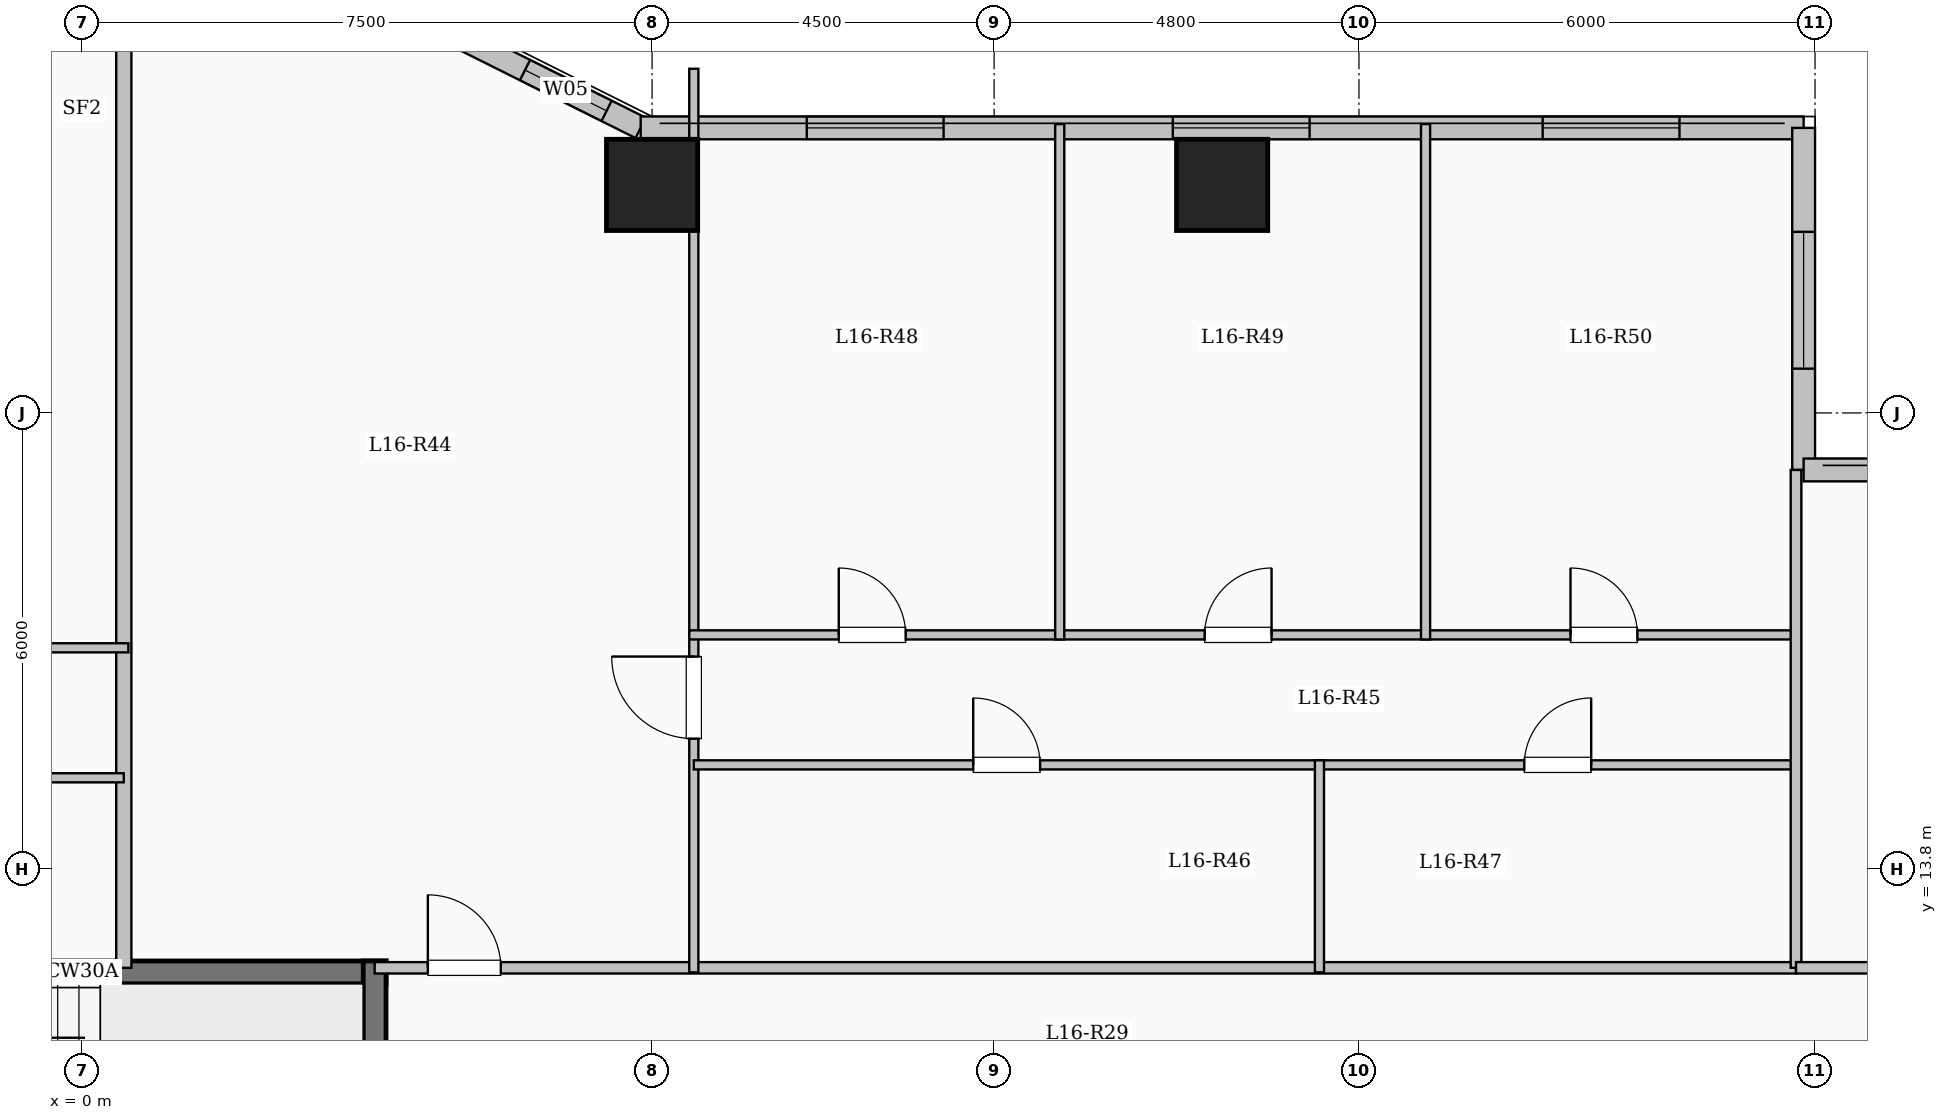
"""IFC4 building model, lengths in metres.
Left out: names, types, materials, properties, quantities, classifications, styles, units other than length and angle.
Written with IfcOpenShell. Run it as: python <this file> out.ifc"""

import sys

from ifc_helpers import new_model, si_unit, direction, frame, frame_2d, origin, origin_2d, place, context, subcontext, project, spatial, rectangle, extrude, element, fill, save


model = new_model("IFC4")
c1 = context("Model", 3, precision=1e-05, world=origin(), true_north=direction((0.0, 1.0)))
c2 = subcontext(c1, "Body", "Model", "MODEL_VIEW")
j1 = project(units=[si_unit("LENGTHUNIT", "METRE"), si_unit("PLANEANGLEUNIT", "RADIAN")], contexts=[c1])
p1 = place(None, origin())
s1 = spatial("IfcSite", under=j1, at=p1, CompositionType="ELEMENT")
p2 = place(p1, origin())
s2 = spatial("IfcBuilding", under=s1, at=p2, CompositionType="ELEMENT")
p3 = place(p2, frame((0.0, 0.0, 60.85)))
s3 = spatial("IfcBuildingStorey", under=s2, at=p3, CompositionType="ELEMENT", Elevation=60.85)
for number, where, z_axis, x_axis in (
    (1, (7.5, 22.8, 0.0), (0.0, 0.0, 1.0), (1.0, 0.0, 0.0)),
    (2, (15.0, 22.8, 0.0), (0.0, 0.0, 1.0), (1.0, 0.0, 0.0)),
):
    element("IfcColumn", number, at=place(p3, frame(where, z_axis=z_axis, x_axis=x_axis)), inside=s3, PredefinedType="COLUMN", context=c2, shape_type="SweptSolid", body=[
        extrude(rectangle(XDim=1.2, YDim=1.2, at=origin_2d()), origin(), (0.0, 0.0, 1.0), 3.35),
    ])
p4 = place(p3, frame((4.35, 25.05, 0.0), z_axis=(0.0, 0.0, 1.0), x_axis=(0.894427191, -0.4472135955, 0.0)))
e3 = element("IfcWall", 3, at=p4, inside=s3, PredefinedType="SOLIDWALL", context=c2, shape_type="SweptSolid", body=[
    extrude(rectangle(XDim=3.354, YDim=0.3, at=frame_2d((1.677, 0.0))), origin(), (0.0, 0.0, 1.0), 3.05),
])
p5 = place(p4, frame((1.653, 0.0, 0.95)))
e4 = element("IfcOpeningElement", 4, at=p5, cuts=e3, PredefinedType="OPENING", context=c2, shape_type="SweptSolid", body=[
    extrude(rectangle(XDim=1.2, YDim=1.5, at=frame_2d((0.6, 0.75))), frame((0.0, 0.16, 0.0), z_axis=(0.0, -1.0, 0.0), x_axis=(1.0, 0.0, 0.0)), (0.0, 0.0, 1.0), 0.32),
])
p6 = place(p3, frame((7.35, 23.55, 0.0), z_axis=(0.0, 0.0, 1.0), x_axis=(1.0, 0.0, 0.0)))
e5 = element("IfcWall", 5, at=p6, inside=s3, PredefinedType="SOLIDWALL", context=c2, shape_type="SweptSolid", body=[
    extrude(rectangle(XDim=15.3, YDim=0.3, at=frame_2d((7.65, 0.0))), origin(), (0.0, 0.0, 1.0), 3.05),
])
p7 = place(p6, frame((2.185, 0.0, 0.9)))
e6 = element("IfcOpeningElement", 6, at=p7, cuts=e5, PredefinedType="OPENING", context=c2, shape_type="SweptSolid", body=[
    extrude(rectangle(XDim=1.8, YDim=1.65, at=frame_2d((0.9, 0.825))), frame((0.0, 0.16, 0.0), z_axis=(0.0, -1.0, 0.0), x_axis=(1.0, 0.0, 0.0)), (0.0, 0.0, 1.0), 0.32),
])
p8 = place(p6, frame((7.001, 0.0, 0.9)))
e7 = element("IfcOpeningElement", 7, at=p8, cuts=e5, PredefinedType="OPENING", context=c2, shape_type="SweptSolid", body=[
    extrude(rectangle(XDim=1.8, YDim=1.65, at=frame_2d((0.9, 0.825))), frame((0.0, 0.16, 0.0), z_axis=(0.0, -1.0, 0.0), x_axis=(1.0, 0.0, 0.0)), (0.0, 0.0, 1.0), 0.32),
])
p9 = place(p6, frame((11.867, 0.0, 0.9)))
e8 = element("IfcOpeningElement", 8, at=p9, cuts=e5, PredefinedType="OPENING", context=c2, shape_type="SweptSolid", body=[
    extrude(rectangle(XDim=1.8, YDim=1.65, at=frame_2d((0.9, 0.825))), frame((0.0, 0.16, 0.0), z_axis=(0.0, -1.0, 0.0), x_axis=(1.0, 0.0, 0.0)), (0.0, 0.0, 1.0), 0.32),
])
p10 = place(p3, frame((22.65, 23.55, 0.0), z_axis=(0.0, 0.0, 1.0), x_axis=(0.0, -1.0, 0.0)))
e9 = element("IfcWall", 9, at=p10, inside=s3, PredefinedType="SOLIDWALL", context=c2, shape_type="SweptSolid", body=[
    extrude(rectangle(XDim=4.5, YDim=0.3, at=frame_2d((2.25, 0.0))), origin(), (0.0, 0.0, 1.0), 3.05),
])
p11 = place(p10, frame((1.367, 0.0, 0.9)))
e10 = element("IfcOpeningElement", 10, at=p11, cuts=e9, PredefinedType="OPENING", context=c2, shape_type="SweptSolid", body=[
    extrude(rectangle(XDim=1.8, YDim=1.65, at=frame_2d((0.9, 0.825))), frame((0.0, 0.16, 0.0), z_axis=(0.0, -1.0, 0.0), x_axis=(1.0, 0.0, 0.0)), (0.0, 0.0, 1.0), 0.32),
])
p12 = place(p3, frame((22.65, 19.05, 0.0), z_axis=(0.0, 0.0, 1.0), x_axis=(1.0, 0.0, 0.0)))
e11 = element("IfcWall", 11, at=p12, inside=s3, PredefinedType="SOLIDWALL", context=c2, shape_type="SweptSolid", body=[
    extrude(rectangle(XDim=6.0, YDim=0.3, at=frame_2d((3.0, 0.0))), origin(), (0.0, 0.0, 1.0), 3.05),
])
p13 = place(p12, frame((1.975, 0.0, 0.9)))
e12 = element("IfcOpeningElement", 12, at=p13, cuts=e11, PredefinedType="OPENING", context=c2, shape_type="SweptSolid", body=[
    extrude(rectangle(XDim=2.0, YDim=1.7, at=frame_2d((1.0, 0.85))), frame((0.0, 0.16, 0.0), z_axis=(0.0, -1.0, 0.0), x_axis=(1.0, 0.0, 0.0)), (0.0, 0.0, 1.0), 0.32),
])
p14 = place(p3, frame((-4.0, 12.44, 0.0), z_axis=(0.0, 0.0, 1.0), x_axis=(1.0, 0.0, 0.0)))
e13 = element("IfcWall", 13, at=p14, inside=s3, PredefinedType="SHEAR", context=c2, shape_type="SweptSolid", body=[
    extrude(rectangle(XDim=8.0, YDim=0.3, at=frame_2d((4.0, 0.0))), origin(), (0.0, 0.0, 1.0), 3.35),
])
p15 = place(p3, frame((3.85, 9.0, 0.0), z_axis=(0.0, 0.0, 1.0), x_axis=(0.0, 1.0, 0.0)))
e14 = element("IfcWall", 14, at=p15, inside=s3, PredefinedType="SHEAR", context=c2, shape_type="SweptSolid", body=[
    extrude(rectangle(XDim=3.59, YDim=0.3, at=frame_2d((1.795, 0.0))), origin(), (0.0, 0.0, 1.0), 3.35),
])
p16 = place(p3, frame((3.85, 12.5, 0.0), z_axis=(0.0, 0.0, 1.0), x_axis=(1.0, 0.0, 0.0)))
e15 = element("IfcWall", 15, at=p16, inside=s3, PredefinedType="PARTITIONING", context=c2, shape_type="SweptSolid", body=[
    extrude(rectangle(XDim=18.7, YDim=0.15, at=frame_2d((9.35, 0.0))), origin(), (0.0, 0.0, 1.0), 3.05),
])
p17 = place(p16, frame((0.7, 0.0, 0.0)))
e16 = element("IfcOpeningElement", 16, at=p17, cuts=e15, PredefinedType="OPENING", context=c2, shape_type="SweptSolid", body=[
    extrude(rectangle(XDim=0.96, YDim=2.15, at=frame_2d((0.48, 1.075))), frame((0.0, 0.085, 0.0), z_axis=(0.0, -1.0, 0.0), x_axis=(1.0, 0.0, 0.0)), (0.0, 0.0, 1.0), 0.17),
])
p18 = place(p3, frame((0.55, 12.5, 0.0), z_axis=(0.0, 0.0, 1.0), x_axis=(0.0, 1.0, 0.0)))
e17 = element("IfcWall", 17, at=p18, inside=s3, PredefinedType="SOLIDWALL", context=c2, shape_type="SweptSolid", body=[
    extrude(rectangle(XDim=12.58, YDim=0.2, at=frame_2d((6.29, 0.0))), origin(), (0.0, 0.0, 1.0), 3.05),
])
p19 = place(p3, frame((-6.807, 15.0, 0.0), z_axis=(0.0, 0.0, 1.0), x_axis=(1.0, 0.0, 0.0)))
e18 = element("IfcWall", 18, at=p19, inside=s3, PredefinedType="PARTITIONING", context=c2, shape_type="SweptSolid", body=[
    extrude(rectangle(XDim=7.357, YDim=0.12, at=frame_2d((3.678, 0.0))), origin(), (0.0, 0.0, 1.0), 2.535),
])
p20 = place(p19, frame((3.239, 0.0, 0.0)))
e19 = element("IfcOpeningElement", 19, at=p20, cuts=e18, PredefinedType="OPENING", context=c2, shape_type="SweptSolid", body=[
    extrude(rectangle(XDim=0.88, YDim=2.1, at=frame_2d((0.44, 1.05))), frame((0.0, 0.07, 0.0), z_axis=(0.0, -1.0, 0.0), x_axis=(1.0, 0.0, 0.0)), (0.0, 0.0, 1.0), 0.14),
])
p21 = place(p3, frame((-15.095, 16.71, 0.0), z_axis=(0.0, 0.0, 1.0), x_axis=(1.0, 0.0, 0.0)))
e20 = element("IfcWall", 20, at=p21, inside=s3, PredefinedType="PARTITIONING", context=c2, shape_type="SweptSolid", body=[
    extrude(rectangle(XDim=15.705, YDim=0.12, at=frame_2d((7.853, 0.0))), origin(), (0.0, 0.0, 1.0), 2.535),
])
p22 = place(p21, frame((1.501, 0.0, 0.0)))
e21 = element("IfcOpeningElement", 21, at=p22, cuts=e20, PredefinedType="OPENING", context=c2, shape_type="SweptSolid", body=[
    extrude(rectangle(XDim=0.88, YDim=2.1, at=frame_2d((0.44, 1.05))), frame((0.0, 0.07, 0.0), z_axis=(0.0, -1.0, 0.0), x_axis=(1.0, 0.0, 0.0)), (0.0, 0.0, 1.0), 0.14),
])
p23 = place(p21, frame((5.382, 0.0, 0.0)))
e22 = element("IfcOpeningElement", 22, at=p23, cuts=e20, PredefinedType="OPENING", context=c2, shape_type="SweptSolid", body=[
    extrude(rectangle(XDim=0.88, YDim=2.1, at=frame_2d((0.44, 1.05))), frame((0.0, 0.07, 0.0), z_axis=(0.0, -1.0, 0.0), x_axis=(1.0, 0.0, 0.0)), (0.0, 0.0, 1.0), 0.14),
])
p24 = place(p21, frame((9.263, 0.0, 0.0)))
e23 = element("IfcOpeningElement", 23, at=p24, cuts=e20, PredefinedType="OPENING", context=c2, shape_type="SweptSolid", body=[
    extrude(rectangle(XDim=0.88, YDim=2.1, at=frame_2d((0.44, 1.05))), frame((0.0, 0.07, 0.0), z_axis=(0.0, -1.0, 0.0), x_axis=(1.0, 0.0, 0.0)), (0.0, 0.0, 1.0), 0.14),
])
p25 = place(p21, frame((13.144, 0.0, 0.0)))
e24 = element("IfcOpeningElement", 24, at=p25, cuts=e20, PredefinedType="OPENING", context=c2, shape_type="SweptSolid", body=[
    extrude(rectangle(XDim=0.88, YDim=2.1, at=frame_2d((0.44, 1.05))), frame((0.0, 0.07, 0.0), z_axis=(0.0, -1.0, 0.0), x_axis=(1.0, 0.0, 0.0)), (0.0, 0.0, 1.0), 0.14),
])
p26 = place(p3, frame((8.049, 12.44, 0.0), z_axis=(0.0, 0.0, 1.0), x_axis=(0.0, 1.0, 0.0)))
e25 = element("IfcWall", 25, at=p26, inside=s3, PredefinedType="PARTITIONING", context=c2, shape_type="SweptSolid", body=[
    extrude(rectangle(XDim=11.888, YDim=0.12, at=frame_2d((5.944, 0.0))), origin(), (0.0, 0.0, 1.0), 2.385),
])
p27 = place(p26, frame((3.075, 0.0, 0.0)))
e26 = element("IfcOpeningElement", 26, at=p27, cuts=e25, PredefinedType="OPENING", context=c2, shape_type="SweptSolid", body=[
    extrude(rectangle(XDim=1.08, YDim=2.15, at=frame_2d((0.54, 1.075))), frame((0.0, 0.07, 0.0), z_axis=(0.0, -1.0, 0.0), x_axis=(1.0, 0.0, 0.0)), (0.0, 0.0, 1.0), 0.14),
])
p28 = place(p3, frame((8.049, 15.17, 0.0), z_axis=(0.0, 0.0, 1.0), x_axis=(1.0, 0.0, 0.0)))
e27 = element("IfcWall", 27, at=p28, inside=s3, PredefinedType="PARTITIONING", context=c2, shape_type="SweptSolid", body=[
    extrude(rectangle(XDim=8.231, YDim=0.12, at=frame_2d((4.115, 0.0))), origin(), (0.0, 0.0, 1.0), 3.05),
])
p29 = place(p28, frame((3.676, 0.0, 0.0)))
e28 = element("IfcOpeningElement", 28, at=p29, cuts=e27, PredefinedType="OPENING", context=c2, shape_type="SweptSolid", body=[
    extrude(rectangle(XDim=0.88, YDim=2.1, at=frame_2d((0.44, 1.05))), frame((0.0, 0.07, 0.0), z_axis=(0.0, -1.0, 0.0), x_axis=(1.0, 0.0, 0.0)), (0.0, 0.0, 1.0), 0.14),
])
p30 = place(p3, frame((16.28, 15.17, 0.0), z_axis=(0.0, 0.0, 1.0), x_axis=(1.0, 0.0, 0.0)))
e29 = element("IfcWall", 29, at=p30, inside=s3, PredefinedType="PARTITIONING", context=c2, shape_type="SweptSolid", body=[
    extrude(rectangle(XDim=6.27, YDim=0.12, at=frame_2d((3.135, 0.0))), origin(), (0.0, 0.0, 1.0), 3.05),
])
p31 = place(p30, frame((2.695, 0.0, 0.0)))
e30 = element("IfcOpeningElement", 30, at=p31, cuts=e29, PredefinedType="OPENING", context=c2, shape_type="SweptSolid", body=[
    extrude(rectangle(XDim=0.88, YDim=2.1, at=frame_2d((0.44, 1.05))), frame((0.0, 0.07, 0.0), z_axis=(0.0, -1.0, 0.0), x_axis=(1.0, 0.0, 0.0)), (0.0, 0.0, 1.0), 0.14),
])
p32 = place(p3, frame((7.989, 16.88, 0.0), z_axis=(0.0, 0.0, 1.0), x_axis=(1.0, 0.0, 0.0)))
e31 = element("IfcWall", 31, at=p32, inside=s3, PredefinedType="PARTITIONING", context=c2, shape_type="SweptSolid", body=[
    extrude(rectangle(XDim=14.621, YDim=0.12, at=frame_2d((7.311, 0.0))), origin(), (0.0, 0.0, 1.0), 3.05),
])
p33 = place(p32, frame((1.967, 0.0, 0.0)))
e32 = element("IfcOpeningElement", 32, at=p33, cuts=e31, PredefinedType="OPENING", context=c2, shape_type="SweptSolid", body=[
    extrude(rectangle(XDim=0.88, YDim=2.1, at=frame_2d((0.44, 1.05))), frame((0.0, 0.07, 0.0), z_axis=(0.0, -1.0, 0.0), x_axis=(1.0, 0.0, 0.0)), (0.0, 0.0, 1.0), 0.14),
])
p34 = place(p32, frame((6.781, 0.0, 0.0)))
e33 = element("IfcOpeningElement", 33, at=p34, cuts=e31, PredefinedType="OPENING", context=c2, shape_type="SweptSolid", body=[
    extrude(rectangle(XDim=0.88, YDim=2.1, at=frame_2d((0.44, 1.05))), frame((0.0, 0.07, 0.0), z_axis=(0.0, -1.0, 0.0), x_axis=(1.0, 0.0, 0.0)), (0.0, 0.0, 1.0), 0.14),
])
p35 = place(p32, frame((11.594, 0.0, 0.0)))
e34 = element("IfcOpeningElement", 34, at=p35, cuts=e31, PredefinedType="OPENING", context=c2, shape_type="SweptSolid", body=[
    extrude(rectangle(XDim=0.88, YDim=2.1, at=frame_2d((0.44, 1.05))), frame((0.0, 0.07, 0.0), z_axis=(0.0, -1.0, 0.0), x_axis=(1.0, 0.0, 0.0)), (0.0, 0.0, 1.0), 0.14),
])
p36 = place(p3, frame((16.28, 12.44, 0.0), z_axis=(0.0, 0.0, 1.0), x_axis=(0.0, 1.0, 0.0)))
e35 = element("IfcWall", 35, at=p36, inside=s3, PredefinedType="PARTITIONING", context=c2, shape_type="SweptSolid", body=[
    extrude(rectangle(XDim=2.79, YDim=0.12, at=frame_2d((1.395, 0.0))), origin(), (0.0, 0.0, 1.0), 3.05),
])
for number, where, z_axis, x_axis in (
    (36, (12.863, 16.82, 0.0), (0.0, 0.0, 1.0), (0.0, 1.0, 0.0)),
    (37, (17.676, 16.82, 0.0), (0.0, 0.0, 1.0), (0.0, 1.0, 0.0)),
):
    element("IfcWall", number, at=place(p3, frame(where, z_axis=z_axis, x_axis=x_axis)), inside=s3, PredefinedType="PARTITIONING", context=c2, shape_type="SweptSolid", body=[
        extrude(rectangle(XDim=6.78, YDim=0.12, at=frame_2d((3.39, 0.0))), origin(), (0.0, 0.0, 1.0), 3.05),
    ])
p37 = place(p3, frame((22.55, 12.5, 0.0), z_axis=(0.0, 0.0, 1.0), x_axis=(0.0, 1.0, 0.0)))
e38 = element("IfcWall", 38, at=p37, inside=s3, PredefinedType="PARTITIONING", context=c2, shape_type="SweptSolid", body=[
    extrude(rectangle(XDim=6.55, YDim=0.14, at=frame_2d((3.275, 0.0))), origin(), (0.0, 0.0, 1.0), 3.05),
])
p38 = place(p3, frame((22.55, 12.5, 0.0), z_axis=(0.0, 0.0, 1.0), x_axis=(1.0, 0.0, 0.0)))
e39 = element("IfcWall", 39, at=p38, inside=s3, PredefinedType="PARTITIONING", context=c2, shape_type="SweptSolid", body=[
    extrude(rectangle(XDim=6.13, YDim=0.15, at=frame_2d((3.065, 0.0))), origin(), (0.0, 0.0, 1.0), 3.05),
])
p39 = place(p38, frame((2.59, 0.0, 0.0)))
e40 = element("IfcOpeningElement", 40, at=p39, cuts=e39, PredefinedType="OPENING", context=c2, shape_type="SweptSolid", body=[
    extrude(rectangle(XDim=0.95, YDim=2.15, at=frame_2d((0.475, 1.075))), frame((0.0, 0.085, 0.0), z_axis=(0.0, -1.0, 0.0), x_axis=(1.0, 0.0, 0.0)), (0.0, 0.0, 1.0), 0.17),
])
p40 = place(p5, origin())
e41 = element("IfcWindow", 41, at=p40, inside=s3, PartitioningType="SINGLE_PANEL", PredefinedType="WINDOW", context=c2, shape_type="SweptSolid", body=[
    extrude(rectangle(XDim=1.2, YDim=1.5, at=frame_2d((0.6, 0.75))), frame((0.0, 0.03, 0.0), z_axis=(0.0, -1.0, 0.0), x_axis=(1.0, 0.0, 0.0)), (0.0, 0.0, 1.0), 0.06),
])
fill(e4, e41)
p41 = place(p7, origin())
e42 = element("IfcWindow", 42, at=p41, inside=s3, PartitioningType="SINGLE_PANEL", PredefinedType="WINDOW", context=c2, shape_type="SweptSolid", body=[
    extrude(rectangle(XDim=1.8, YDim=1.65, at=frame_2d((0.9, 0.825))), frame((0.0, 0.03, 0.0), z_axis=(0.0, -1.0, 0.0), x_axis=(1.0, 0.0, 0.0)), (0.0, 0.0, 1.0), 0.06),
])
fill(e6, e42)
p42 = place(p8, origin())
e43 = element("IfcWindow", 43, at=p42, inside=s3, PartitioningType="SINGLE_PANEL", PredefinedType="WINDOW", context=c2, shape_type="SweptSolid", body=[
    extrude(rectangle(XDim=1.8, YDim=1.65, at=frame_2d((0.9, 0.825))), frame((0.0, 0.03, 0.0), z_axis=(0.0, -1.0, 0.0), x_axis=(1.0, 0.0, 0.0)), (0.0, 0.0, 1.0), 0.06),
])
fill(e7, e43)
p43 = place(p9, origin())
e44 = element("IfcWindow", 44, at=p43, inside=s3, PartitioningType="SINGLE_PANEL", PredefinedType="WINDOW", context=c2, shape_type="SweptSolid", body=[
    extrude(rectangle(XDim=1.8, YDim=1.65, at=frame_2d((0.9, 0.825))), frame((0.0, 0.03, 0.0), z_axis=(0.0, -1.0, 0.0), x_axis=(1.0, 0.0, 0.0)), (0.0, 0.0, 1.0), 0.06),
])
fill(e8, e44)
p44 = place(p11, origin())
e45 = element("IfcWindow", 45, at=p44, inside=s3, PartitioningType="SINGLE_PANEL", PredefinedType="WINDOW", context=c2, shape_type="SweptSolid", body=[
    extrude(rectangle(XDim=1.8, YDim=1.65, at=frame_2d((0.9, 0.825))), frame((0.0, 0.03, 0.0), z_axis=(0.0, -1.0, 0.0), x_axis=(1.0, 0.0, 0.0)), (0.0, 0.0, 1.0), 0.06),
])
fill(e10, e45)
p45 = place(p17, origin())
e46 = element("IfcDoor", 46, at=p45, inside=s3, OperationType="SINGLE_SWING_LEFT", PredefinedType="DOOR", context=c2, shape_type="SweptSolid", body=[
    extrude(rectangle(XDim=0.96, YDim=2.15, at=frame_2d((0.48, 1.075))), frame((0.0, 0.025, 0.0), z_axis=(0.0, -1.0, 0.0), x_axis=(1.0, 0.0, 0.0)), (0.0, 0.0, 1.0), 0.05),
])
fill(e16, e46)
p46 = place(p27, origin())
e47 = element("IfcDoor", 47, at=p46, inside=s3, OperationType="SINGLE_SWING_RIGHT", PredefinedType="DOOR", context=c2, shape_type="SweptSolid", body=[
    extrude(rectangle(XDim=1.08, YDim=2.15, at=frame_2d((0.54, 1.075))), frame((0.0, 0.025, 0.0), z_axis=(0.0, -1.0, 0.0), x_axis=(1.0, 0.0, 0.0)), (0.0, 0.0, 1.0), 0.05),
])
fill(e26, e47)
p47 = place(p29, origin())
e48 = element("IfcDoor", 48, at=p47, inside=s3, OperationType="SINGLE_SWING_LEFT", PredefinedType="DOOR", context=c2, shape_type="SweptSolid", body=[
    extrude(rectangle(XDim=0.88, YDim=2.1, at=frame_2d((0.44, 1.05))), frame((0.0, 0.025, 0.0), z_axis=(0.0, -1.0, 0.0), x_axis=(1.0, 0.0, 0.0)), (0.0, 0.0, 1.0), 0.05),
])
fill(e28, e48)
p48 = place(p31, origin())
e49 = element("IfcDoor", 49, at=p48, inside=s3, OperationType="SINGLE_SWING_RIGHT", PredefinedType="DOOR", context=c2, shape_type="SweptSolid", body=[
    extrude(rectangle(XDim=0.88, YDim=2.1, at=frame_2d((0.44, 1.05))), frame((0.0, 0.025, 0.0), z_axis=(0.0, -1.0, 0.0), x_axis=(1.0, 0.0, 0.0)), (0.0, 0.0, 1.0), 0.05),
])
fill(e30, e49)
p49 = place(p33, origin())
e50 = element("IfcDoor", 50, at=p49, inside=s3, OperationType="SINGLE_SWING_LEFT", PredefinedType="DOOR", context=c2, shape_type="SweptSolid", body=[
    extrude(rectangle(XDim=0.88, YDim=2.1, at=frame_2d((0.44, 1.05))), frame((0.0, 0.025, 0.0), z_axis=(0.0, -1.0, 0.0), x_axis=(1.0, 0.0, 0.0)), (0.0, 0.0, 1.0), 0.05),
])
fill(e32, e50)
p50 = place(p34, origin())
e51 = element("IfcDoor", 51, at=p50, inside=s3, OperationType="SINGLE_SWING_RIGHT", PredefinedType="DOOR", context=c2, shape_type="SweptSolid", body=[
    extrude(rectangle(XDim=0.88, YDim=2.1, at=frame_2d((0.44, 1.05))), frame((0.0, 0.025, 0.0), z_axis=(0.0, -1.0, 0.0), x_axis=(1.0, 0.0, 0.0)), (0.0, 0.0, 1.0), 0.05),
])
fill(e33, e51)
p51 = place(p35, origin())
e52 = element("IfcDoor", 52, at=p51, inside=s3, OperationType="SINGLE_SWING_LEFT", PredefinedType="DOOR", context=c2, shape_type="SweptSolid", body=[
    extrude(rectangle(XDim=0.88, YDim=2.1, at=frame_2d((0.44, 1.05))), frame((0.0, 0.025, 0.0), z_axis=(0.0, -1.0, 0.0), x_axis=(1.0, 0.0, 0.0)), (0.0, 0.0, 1.0), 0.05),
])
fill(e34, e52)
save(model, sys.argv[1])
